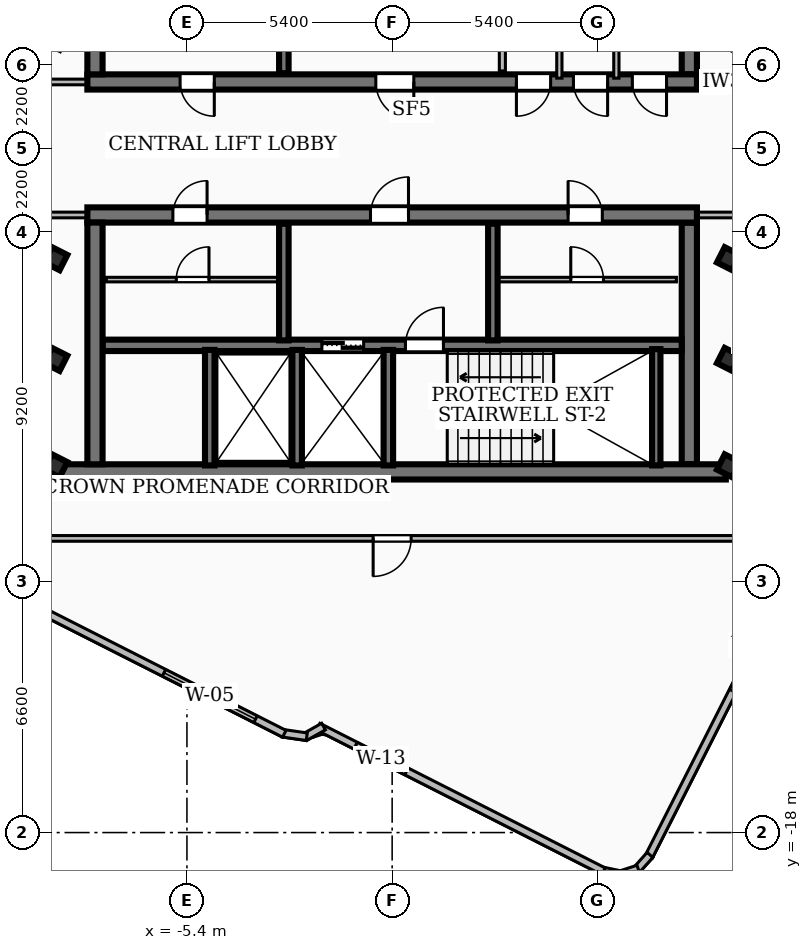
"""IFC4 building model, lengths in metres.
Left out: names, types, materials, properties, quantities, classifications, styles, units other than length and angle.
Written with IfcOpenShell. Run it as: python <this file> out.ifc"""

import sys

from ifc_helpers import new_model, si_unit, direction, frame, frame_2d, origin, origin_2d, place, context, subcontext, project, spatial, rectangle, hollow_rectangle, extrude, element, fill, save


model = new_model("IFC4")
c1 = context("Model", 3, precision=1e-05, world=origin(), true_north=direction((0.0, 1.0)))
c2 = subcontext(c1, "Body", "Model", "MODEL_VIEW")
j1 = project(units=[si_unit("LENGTHUNIT", "METRE"), si_unit("PLANEANGLEUNIT", "RADIAN")], contexts=[c1])
p1 = place(None, origin())
s1 = spatial("IfcSite", under=j1, at=p1, CompositionType="ELEMENT")
p2 = place(p1, origin())
s2 = spatial("IfcBuilding", under=s1, at=p2, CompositionType="ELEMENT")
p3 = place(p2, frame((0.0, 0.0, 289.26)))
s3 = spatial("IfcBuildingStorey", under=s2, at=p3, CompositionType="ELEMENT", Elevation=289.26)
p4 = place(p3, frame((8.02, 1.75, 0.0), z_axis=(0.0, 0.0, 1.0), x_axis=(-1.0, 0.0, 0.0)))
e1 = element("IfcWall", 1, at=p4, inside=s3, PredefinedType="SHEAR", context=c2, shape_type="SweptSolid", body=[
    extrude(rectangle(XDim=16.04, YDim=0.4, at=frame_2d((8.02, 0.0))), origin(), (0.0, 0.0, 1.0), 3.84),
])
p5 = place(p4, frame((7.45, 0.0, 0.0)))
e2 = element("IfcOpeningElement", 2, at=p5, cuts=e1, PredefinedType="OPENING", context=c2, shape_type="SweptSolid", body=[
    extrude(rectangle(XDim=1.0, YDim=2.1, at=frame_2d((0.5, 1.05))), frame((0.0, 0.21, 0.0), z_axis=(0.0, -1.0, 0.0), x_axis=(1.0, 0.0, 0.0)), (0.0, 0.0, 1.0), 0.42),
])
p6 = place(p4, frame((12.7, 0.0, 0.0)))
e3 = element("IfcOpeningElement", 3, at=p6, cuts=e1, PredefinedType="OPENING", context=c2, shape_type="SweptSolid", body=[
    extrude(rectangle(XDim=0.9, YDim=2.06, at=frame_2d((0.45, 1.03))), frame((0.0, 0.21, 0.0), z_axis=(0.0, -1.0, 0.0), x_axis=(1.0, 0.0, 0.0)), (0.0, 0.0, 1.0), 0.42),
])
p7 = place(p4, frame((3.85, 0.0, 0.0)))
e4 = element("IfcOpeningElement", 4, at=p7, cuts=e1, PredefinedType="OPENING", context=c2, shape_type="SweptSolid", body=[
    extrude(rectangle(XDim=0.9, YDim=2.06, at=frame_2d((0.45, 1.03))), frame((0.0, 0.21, 0.0), z_axis=(0.0, -1.0, 0.0), x_axis=(1.0, 0.0, 0.0)), (0.0, 0.0, 1.0), 0.42),
])
p8 = place(p4, frame((2.35, 0.0, 0.0)))
e5 = element("IfcOpeningElement", 5, at=p8, cuts=e1, PredefinedType="OPENING", context=c2, shape_type="SweptSolid", body=[
    extrude(rectangle(XDim=0.9, YDim=2.06, at=frame_2d((0.45, 1.03))), frame((0.0, 0.21, 0.0), z_axis=(0.0, -1.0, 0.0), x_axis=(1.0, 0.0, 0.0)), (0.0, 0.0, 1.0), 0.42),
])
p9 = place(p4, frame((0.8, 0.0, 0.0)))
e6 = element("IfcOpeningElement", 6, at=p9, cuts=e1, PredefinedType="OPENING", context=c2, shape_type="SweptSolid", body=[
    extrude(rectangle(XDim=0.9, YDim=2.06, at=frame_2d((0.45, 1.03))), frame((0.0, 0.21, 0.0), z_axis=(0.0, -1.0, 0.0), x_axis=(1.0, 0.0, 0.0)), (0.0, 0.0, 1.0), 0.42),
])
for number, where, z_axis, x_axis in (
    (7, (-7.82, 1.95, 0.0), (0.0, 0.0, 1.0), (0.0, 1.0, 0.0)),
    (8, (7.82, 8.31, 0.0), (0.0, 0.0, 1.0), (0.0, -1.0, 0.0)),
):
    element("IfcWall", number, at=place(p3, frame(where, z_axis=z_axis, x_axis=x_axis)), inside=s3, PredefinedType="SHEAR", context=c2, shape_type="SweptSolid", body=[
        extrude(rectangle(XDim=6.36, YDim=0.4, at=frame_2d((3.18, 0.0))), origin(), (0.0, 0.0, 1.0), 3.84),
    ])
p10 = place(p3, frame((8.78, -8.51, 0.0), z_axis=(0.0, 0.0, 1.0), x_axis=(-1.0, 0.0, 0.0)))
e9 = element("IfcWall", 9, at=p10, inside=s3, PredefinedType="SHEAR", context=c2, shape_type="SweptSolid", body=[
    extrude(rectangle(XDim=17.56, YDim=0.4, at=frame_2d((8.78, 0.0))), origin(), (0.0, 0.0, 1.0), 3.84),
])
p11 = place(p3, frame((-8.02, -1.75, 0.0), z_axis=(0.0, 0.0, 1.0), x_axis=(1.0, 0.0, 0.0)))
e10 = element("IfcWall", 10, at=p11, inside=s3, PredefinedType="SHEAR", context=c2, shape_type="SweptSolid", body=[
    extrude(rectangle(XDim=16.04, YDim=0.4, at=frame_2d((8.02, 0.0))), origin(), (0.0, 0.0, 1.0), 3.84),
])
p12 = place(p11, frame((7.45, 0.0, 0.0)))
e11 = element("IfcOpeningElement", 11, at=p12, cuts=e10, PredefinedType="OPENING", context=c2, shape_type="SweptSolid", body=[
    extrude(rectangle(XDim=1.0, YDim=2.1, at=frame_2d((0.5, 1.05))), frame((0.0, 0.21, 0.0), z_axis=(0.0, -1.0, 0.0), x_axis=(1.0, 0.0, 0.0)), (0.0, 0.0, 1.0), 0.42),
])
p13 = place(p11, frame((12.65, 0.0, 0.0)))
e12 = element("IfcOpeningElement", 12, at=p13, cuts=e10, PredefinedType="OPENING", context=c2, shape_type="SweptSolid", body=[
    extrude(rectangle(XDim=0.9, YDim=2.06, at=frame_2d((0.45, 1.03))), frame((0.0, 0.21, 0.0), z_axis=(0.0, -1.0, 0.0), x_axis=(1.0, 0.0, 0.0)), (0.0, 0.0, 1.0), 0.42),
])
p14 = place(p11, frame((2.25, 0.0, 0.0)))
e13 = element("IfcOpeningElement", 13, at=p14, cuts=e10, PredefinedType="OPENING", context=c2, shape_type="SweptSolid", body=[
    extrude(rectangle(XDim=0.9, YDim=2.06, at=frame_2d((0.45, 1.03))), frame((0.0, 0.21, 0.0), z_axis=(0.0, -1.0, 0.0), x_axis=(1.0, 0.0, 0.0)), (0.0, 0.0, 1.0), 0.42),
])
for number, where, z_axis, x_axis in (
    (14, (-7.82, -8.31, 0.0), (0.0, 0.0, 1.0), (0.0, 1.0, 0.0)),
    (15, (7.82, -1.95, 0.0), (0.0, 0.0, 1.0), (0.0, -1.0, 0.0)),
):
    element("IfcWall", number, at=place(p3, frame(where, z_axis=z_axis, x_axis=x_axis)), inside=s3, PredefinedType="SHEAR", context=c2, shape_type="SweptSolid", body=[
        extrude(rectangle(XDim=6.36, YDim=0.4, at=frame_2d((3.18, 0.0))), origin(), (0.0, 0.0, 1.0), 3.84),
    ])
p15 = place(p3, frame((-7.62, -5.18, 0.0), z_axis=(0.0, 0.0, 1.0), x_axis=(1.0, 0.0, 0.0)))
e16 = element("IfcWall", 16, at=p15, inside=s3, PredefinedType="SOLIDWALL", context=c2, shape_type="SweptSolid", body=[
    extrude(rectangle(XDim=15.24, YDim=0.3, at=frame_2d((7.62, 0.0))), origin(), (0.0, 0.0, 1.0), 3.84),
])
p16 = place(p15, frame((5.77, 0.0, 0.0)))
e17 = element("IfcOpeningElement", 17, at=p16, cuts=e16, PredefinedType="OPENING", context=c2, shape_type="SweptSolid", body=[
    extrude(rectangle(XDim=1.1, YDim=2.15, at=frame_2d((0.55, 1.075))), frame((0.0, 0.16, 0.0), z_axis=(0.0, -1.0, 0.0), x_axis=(1.0, 0.0, 0.0)), (0.0, 0.0, 1.0), 0.32),
])
p17 = place(p15, frame((7.97, 0.0, 0.0)))
e18 = element("IfcOpeningElement", 18, at=p17, cuts=e16, PredefinedType="OPENING", context=c2, shape_type="SweptSolid", body=[
    extrude(rectangle(XDim=1.0, YDim=2.1, at=frame_2d((0.5, 1.05))), frame((0.0, 0.16, 0.0), z_axis=(0.0, -1.0, 0.0), x_axis=(1.0, 0.0, 0.0)), (0.0, 0.0, 1.0), 0.32),
])
p18 = place(p3, frame((6.95, -8.34, 0.0), z_axis=(0.0, 0.0, 1.0), x_axis=(0.0, 1.0, 0.0)))
e19 = element("IfcWall", 19, at=p18, inside=s3, PredefinedType="SOLIDWALL", context=c2, shape_type="SweptSolid", body=[
    extrude(rectangle(XDim=3.06, YDim=0.22, at=frame_2d((1.53, 0.0))), origin(), (0.0, 0.0, 1.0), 3.84),
])
p19 = place(p3, frame((-2.85, 1.98, 0.0), z_axis=(0.0, 0.0, 1.0), x_axis=(0.0, 1.0, 0.0)))
e20 = element("IfcWall", 20, at=p19, inside=s3, PredefinedType="SOLIDWALL", context=c2, shape_type="SweptSolid", body=[
    extrude(rectangle(XDim=3.07, YDim=0.25, at=frame_2d((1.535, 0.0))), origin(), (0.0, 0.0, 1.0), 3.84),
])
for number, where, z_axis, x_axis in (
    (21, (-0.1, -8.34, 0.0), (0.0, 0.0, 1.0), (0.0, 1.0, 0.0)),
    (22, (-2.5, -8.34, 0.0), (0.0, 0.0, 1.0), (0.0, 1.0, 0.0)),
    (23, (-4.8, -8.34, 0.0), (0.0, 0.0, 1.0), (0.0, 1.0, 0.0)),
):
    element("IfcWall", number, at=place(p3, frame(where, z_axis=z_axis, x_axis=x_axis)), inside=s3, PredefinedType="SOLIDWALL", context=c2, shape_type="SweptSolid", body=[
        extrude(rectangle(XDim=3.04, YDim=0.25, at=frame_2d((1.52, 0.0))), origin(), (0.0, 0.0, 1.0), 3.84),
    ])
for number, where, z_axis, x_axis in (
    (24, (-2.85, -5.05, 0.0), (0.0, 0.0, 1.0), (0.0, 1.0, 0.0)),
    (25, (2.65, -5.05, 0.0), (0.0, 0.0, 1.0), (0.0, 1.0, 0.0)),
):
    element("IfcWall", number, at=place(p3, frame(where, z_axis=z_axis, x_axis=x_axis)), inside=s3, PredefinedType="SOLIDWALL", context=c2, shape_type="SweptSolid", body=[
        extrude(rectangle(XDim=3.07, YDim=0.25, at=frame_2d((1.535, 0.0))), origin(), (0.0, 0.0, 1.0), 3.84),
    ])
for number, where, z_axis, x_axis in (
    (26, (-8.85, -5.55, 0.0), (0.0, 0.0, 1.0), (0.452, 0.892, 0.0)),
    (27, (-8.85, -2.9, 0.0), (0.0, 0.0, 1.0), (0.452, 0.892, 0.0)),
    (28, (8.85, -5.55, 0.0), (0.0, 0.0, 1.0), (0.452, 0.892, 0.0)),
    (29, (8.85, -2.9, 0.0), (0.0, 0.0, 1.0), (0.452, 0.892, 0.0)),
    (30, (8.85, -8.35, 0.0), (0.0, 0.0, 1.0), (0.452, 0.892, 0.0)),
    (31, (-8.85, -8.35, 0.0), (0.0, 0.0, 1.0), (0.452, 0.892, 0.0)),
):
    element("IfcColumn", number, at=place(p3, frame(where, z_axis=z_axis, x_axis=x_axis)), inside=s3, PredefinedType="COLUMN", context=c2, shape_type="SweptSolid", body=[
        extrude(hollow_rectangle(XDim=0.45, YDim=0.45, WallThickness=0.022, at=origin_2d()), origin(), (0.0, 0.0, 1.0), 4.14),
    ])
p20 = place(p3, frame((10.569, -11.109, 0.0), z_axis=(0.0, 0.0, 1.0), x_axis=(-0.452141134176, -0.891946408024, 0.0)))
e32 = element("IfcWall", 32, at=p20, inside=s3, PredefinedType="SOLIDWALL", context=c2, shape_type="SweptSolid", body=[
    extrude(rectangle(XDim=8.431, YDim=0.2, at=frame_2d((4.215, 0.0))), origin(), (0.0, 0.0, 1.0), 3.84),
])
p21 = place(p20, frame((0.85, 0.0, 0.85)))
e33 = element("IfcOpeningElement", 33, at=p21, cuts=e32, PredefinedType="OPENING", context=c2, shape_type="SweptSolid", body=[
    extrude(rectangle(XDim=2.7, YDim=1.65, at=frame_2d((1.35, 0.825))), frame((0.0, 0.11, 0.0), z_axis=(0.0, -1.0, 0.0), x_axis=(1.0, 0.0, 0.0)), (0.0, 0.0, 1.0), 0.22),
])
p22 = place(p3, frame((6.785, -18.588, 0.0), z_axis=(0.0, 0.0, 1.0), x_axis=(-0.665997400104, -0.745954062295, 0.0)))
e34 = element("IfcWall", 34, at=p22, inside=s3, PredefinedType="SOLIDWALL", context=c2, shape_type="SweptSolid", body=[
    extrude(rectangle(XDim=0.528, YDim=0.2, at=frame_2d((0.264, 0.0))), origin(), (0.0, 0.0, 1.0), 3.84),
])
p23 = place(p3, frame((6.474, -18.955, 0.0), z_axis=(0.0, 0.0, 1.0), x_axis=(-0.950471064968, -0.310813054196, 0.0)))
e35 = element("IfcWall", 35, at=p23, inside=s3, PredefinedType="SOLIDWALL", context=c2, shape_type="SweptSolid", body=[
    extrude(rectangle(XDim=0.514, YDim=0.2, at=frame_2d((0.257, 0.0))), origin(), (0.0, 0.0, 1.0), 3.84),
])
p24 = place(p3, frame((6.033, -19.112, 0.0), z_axis=(0.0, 0.0, 1.0), x_axis=(-0.978721450967, 0.205193375664, 0.0)))
e36 = element("IfcWall", 36, at=p24, inside=s3, PredefinedType="SOLIDWALL", context=c2, shape_type="SweptSolid", body=[
    extrude(rectangle(XDim=0.527, YDim=0.2, at=frame_2d((0.264, 0.0))), origin(), (0.0, 0.0, 1.0), 3.84),
])
p25 = place(p3, frame((5.563, -19.02, 0.0), z_axis=(0.0, 0.0, 1.0), x_axis=(-0.891972005999, 0.452090633076, 0.0)))
e37 = element("IfcWall", 37, at=p25, inside=s3, PredefinedType="SOLIDWALL", context=c2, shape_type="SweptSolid", body=[
    extrude(rectangle(XDim=8.418, YDim=0.2, at=frame_2d((4.209, 0.0))), origin(), (0.0, 0.0, 1.0), 3.84),
])
p26 = place(p25, frame((5.816, 0.0, 0.85)))
e38 = element("IfcOpeningElement", 38, at=p26, cuts=e37, PredefinedType="OPENING", context=c2, shape_type="SweptSolid", body=[
    extrude(rectangle(XDim=1.5, YDim=1.8, at=frame_2d((0.75, 0.9))), frame((0.0, 0.11, 0.0), z_axis=(0.0, -1.0, 0.0), x_axis=(1.0, 0.0, 0.0)), (0.0, 0.0, 1.0), 0.22),
])
p27 = place(p3, frame((-1.805, -15.211, 0.0), z_axis=(0.0, 0.0, 1.0), x_axis=(-0.871517430789, -0.490364525461, 0.0)))
e39 = element("IfcWall", 39, at=p27, inside=s3, PredefinedType="SOLIDWALL", context=c2, shape_type="SweptSolid", body=[
    extrude(rectangle(XDim=0.561, YDim=0.2, at=frame_2d((0.281, 0.0))), origin(), (0.0, 0.0, 1.0), 3.84),
])
p28 = place(p3, frame((-2.247, -15.478, 0.0), z_axis=(0.0, 0.0, 1.0), x_axis=(-0.989720602345, 0.143014437364, 0.0)))
e40 = element("IfcWall", 40, at=p28, inside=s3, PredefinedType="SOLIDWALL", context=c2, shape_type="SweptSolid", body=[
    extrude(rectangle(XDim=0.644, YDim=0.2, at=frame_2d((0.322, 0.0))), origin(), (0.0, 0.0, 1.0), 3.84),
])
p29 = place(p3, frame((-2.837, -15.401, 0.0), z_axis=(0.0, 0.0, 1.0), x_axis=(-0.891990770647, 0.452053608636, 0.0)))
e41 = element("IfcWall", 41, at=p29, inside=s3, PredefinedType="SOLIDWALL", context=c2, shape_type="SweptSolid", body=[
    extrude(rectangle(XDim=8.866, YDim=0.2, at=frame_2d((4.433, 0.0))), origin(), (0.0, 0.0, 1.0), 3.84),
])
p30 = place(p29, frame((0.85, 0.0, 0.85)))
e42 = element("IfcOpeningElement", 42, at=p30, cuts=e41, PredefinedType="OPENING", context=c2, shape_type="SweptSolid", body=[
    extrude(rectangle(XDim=2.7, YDim=1.85, at=frame_2d((1.35, 0.925))), frame((0.0, 0.11, 0.0), z_axis=(0.0, -1.0, 0.0), x_axis=(1.0, 0.0, 0.0)), (0.0, 0.0, 1.0), 0.22),
])
p31 = place(p3, frame((2.9, 2.04, 0.0), z_axis=(0.0, 0.0, 1.0), x_axis=(0.0, 1.0, 0.0)))
e43 = element("IfcWall", 43, at=p31, inside=s3, PredefinedType="PARTITIONING", context=c2, shape_type="SweptSolid", body=[
    extrude(rectangle(XDim=2.94, YDim=0.16, at=frame_2d((1.47, 0.0))), origin(), (0.0, 0.0, 1.0), 3.07),
])
p32 = place(p31, frame((1.82, 0.0, 0.0)))
e44 = element("IfcOpeningElement", 44, at=p32, cuts=e43, PredefinedType="OPENING", context=c2, shape_type="SweptSolid", body=[
    extrude(rectangle(XDim=0.9, YDim=2.06, at=frame_2d((0.45, 1.03))), frame((0.0, 0.09, 0.0), z_axis=(0.0, -1.0, 0.0), x_axis=(1.0, 0.0, 0.0)), (0.0, 0.0, 1.0), 0.18),
])
p33 = place(p3, frame((2.8, -3.45, 0.0), z_axis=(0.0, 0.0, 1.0), x_axis=(1.0, 0.0, 0.0)))
e45 = element("IfcWall", 45, at=p33, inside=s3, PredefinedType="PARTITIONING", context=c2, shape_type="SweptSolid", body=[
    extrude(rectangle(XDim=4.68, YDim=0.12, at=frame_2d((2.34, 0.0))), origin(), (0.0, 0.0, 1.0), 3.84),
])
p34 = place(p33, frame((1.9, 0.0, 0.0)))
e46 = element("IfcOpeningElement", 46, at=p34, cuts=e45, PredefinedType="OPENING", context=c2, shape_type="SweptSolid", body=[
    extrude(rectangle(XDim=0.86, YDim=2.04, at=frame_2d((0.43, 1.02))), frame((0.0, 0.07, 0.0), z_axis=(0.0, -1.0, 0.0), x_axis=(1.0, 0.0, 0.0)), (0.0, 0.0, 1.0), 0.14),
])
p35 = place(p3, frame((-7.52, -3.45, 0.0), z_axis=(0.0, 0.0, 1.0), x_axis=(1.0, 0.0, 0.0)))
e47 = element("IfcWall", 47, at=p35, inside=s3, PredefinedType="PARTITIONING", context=c2, shape_type="SweptSolid", body=[
    extrude(rectangle(XDim=4.54, YDim=0.12, at=frame_2d((2.27, 0.0))), origin(), (0.0, 0.0, 1.0), 3.21),
])
p36 = place(p35, frame((1.84, 0.0, 0.0)))
e48 = element("IfcOpeningElement", 48, at=p36, cuts=e47, PredefinedType="OPENING", context=c2, shape_type="SweptSolid", body=[
    extrude(rectangle(XDim=0.86, YDim=2.04, at=frame_2d((0.43, 1.02))), frame((0.0, 0.07, 0.0), z_axis=(0.0, -1.0, 0.0), x_axis=(1.0, 0.0, 0.0)), (0.0, 0.0, 1.0), 0.14),
])
for number, where, z_axis, x_axis in (
    (49, (4.4, 1.85, 0.0), (0.0, 0.0, 1.0), (0.0, 1.0, 0.0)),
    (50, (5.9, 1.85, 0.0), (0.0, 0.0, 1.0), (0.0, 1.0, 0.0)),
):
    element("IfcWall", number, at=place(p3, frame(where, z_axis=z_axis, x_axis=x_axis)), inside=s3, PredefinedType="PARTITIONING", context=c2, shape_type="SweptSolid", body=[
        extrude(rectangle(XDim=1.89, YDim=0.138, at=frame_2d((0.945, 0.0))), origin(), (0.0, 0.0, 1.0), 3.07),
    ])
for number, where, z_axis, x_axis in (
    (51, (-7.85, 1.75, 0.0), (0.0, 0.0, 1.0), (-1.0, 0.0, 0.0)),
    (52, (-7.85, -1.75, 0.0), (0.0, 0.0, 1.0), (-1.0, 0.0, 0.0)),
    (53, (7.85, 1.75, 0.0), (0.0, 0.0, 1.0), (1.0, 0.0, 0.0)),
    (54, (7.85, -1.75, 0.0), (0.0, 0.0, 1.0), (1.0, 0.0, 0.0)),
):
    element("IfcWall", number, at=place(p3, frame(where, z_axis=z_axis, x_axis=x_axis)), inside=s3, PredefinedType="PARTITIONING", context=c2, shape_type="SweptSolid", body=[
        extrude(rectangle(XDim=1.67, YDim=0.15, at=frame_2d((0.835, 0.0))), origin(), (0.0, 0.0, 1.0), 3.07),
    ])
p37 = place(p3, frame((13.584, -10.26, 0.0), z_axis=(0.0, 0.0, 1.0), x_axis=(-1.0, 0.0, 0.0)))
e55 = element("IfcWall", 55, at=p37, inside=s3, PredefinedType="PARTITIONING", context=c2, shape_type="SweptSolid", body=[
    extrude(rectangle(XDim=25.159, YDim=0.15, at=frame_2d((12.58, 0.0))), origin(), (0.0, 0.0, 1.0), 3.84),
])
p38 = place(p37, frame((13.084, 0.0, 0.0)))
e56 = element("IfcOpeningElement", 56, at=p38, cuts=e55, PredefinedType="OPENING", context=c2, shape_type="SweptSolid", body=[
    extrude(rectangle(XDim=1.0, YDim=2.1, at=frame_2d((0.5, 1.05))), frame((0.0, 0.085, 0.0), z_axis=(0.0, -1.0, 0.0), x_axis=(1.0, 0.0, 0.0)), (0.0, 0.0, 1.0), 0.17),
])
p39 = place(p21, origin())
e57 = element("IfcWindow", 57, at=p39, inside=s3, PartitioningType="SINGLE_PANEL", PredefinedType="WINDOW", context=c2, shape_type="SweptSolid", body=[
    extrude(rectangle(XDim=2.7, YDim=1.65, at=frame_2d((1.35, 0.825))), frame((0.0, 0.03, 0.0), z_axis=(0.0, -1.0, 0.0), x_axis=(1.0, 0.0, 0.0)), (0.0, 0.0, 1.0), 0.06),
])
fill(e33, e57)
p40 = place(p26, origin())
e58 = element("IfcWindow", 58, at=p40, inside=s3, PartitioningType="SINGLE_PANEL", PredefinedType="WINDOW", context=c2, shape_type="SweptSolid", body=[
    extrude(rectangle(XDim=1.5, YDim=1.8, at=frame_2d((0.75, 0.9))), frame((0.0, 0.03, 0.0), z_axis=(0.0, -1.0, 0.0), x_axis=(1.0, 0.0, 0.0)), (0.0, 0.0, 1.0), 0.06),
])
fill(e38, e58)
p41 = place(p30, origin())
e59 = element("IfcWindow", 59, at=p41, inside=s3, PartitioningType="SINGLE_PANEL", PredefinedType="WINDOW", context=c2, shape_type="SweptSolid", body=[
    extrude(rectangle(XDim=2.7, YDim=1.85, at=frame_2d((1.35, 0.925))), frame((0.0, 0.03, 0.0), z_axis=(0.0, -1.0, 0.0), x_axis=(1.0, 0.0, 0.0)), (0.0, 0.0, 1.0), 0.06),
])
fill(e42, e59)
p42 = place(p5, origin())
e60 = element("IfcDoor", 60, at=p42, inside=s3, OperationType="SINGLE_SWING_LEFT", PredefinedType="DOOR", context=c2, shape_type="SweptSolid", body=[
    extrude(rectangle(XDim=1.0, YDim=2.1, at=frame_2d((0.5, 1.05))), frame((0.0, 0.025, 0.0), z_axis=(0.0, -1.0, 0.0), x_axis=(1.0, 0.0, 0.0)), (0.0, 0.0, 1.0), 0.05),
])
fill(e2, e60)
p43 = place(p12, origin())
e61 = element("IfcDoor", 61, at=p43, inside=s3, OperationType="SINGLE_SWING_RIGHT", PredefinedType="DOOR", context=c2, shape_type="SweptSolid", body=[
    extrude(rectangle(XDim=1.0, YDim=2.1, at=frame_2d((0.5, 1.05))), frame((0.0, 0.025, 0.0), z_axis=(0.0, -1.0, 0.0), x_axis=(1.0, 0.0, 0.0)), (0.0, 0.0, 1.0), 0.05),
])
fill(e11, e61)
p44 = place(p16, origin())
e62 = element("IfcDoor", 62, at=p44, inside=s3, OperationType="DOUBLE_DOOR_SLIDING", PredefinedType="DOOR", context=c2, shape_type="SweptSolid", body=[
    extrude(rectangle(XDim=1.1, YDim=2.15, at=frame_2d((0.55, 1.075))), frame((0.0, 0.025, 0.0), z_axis=(0.0, -1.0, 0.0), x_axis=(1.0, 0.0, 0.0)), (0.0, 0.0, 1.0), 0.05),
])
fill(e17, e62)
p45 = place(p17, origin())
e63 = element("IfcDoor", 63, at=p45, inside=s3, OperationType="SINGLE_SWING_RIGHT", PredefinedType="DOOR", context=c2, shape_type="SweptSolid", body=[
    extrude(rectangle(XDim=1.0, YDim=2.1, at=frame_2d((0.5, 1.05))), frame((0.0, 0.025, 0.0), z_axis=(0.0, -1.0, 0.0), x_axis=(1.0, 0.0, 0.0)), (0.0, 0.0, 1.0), 0.05),
])
fill(e18, e63)
p46 = place(p6, origin())
e64 = element("IfcDoor", 64, at=p46, inside=s3, OperationType="SINGLE_SWING_LEFT", PredefinedType="DOOR", context=c2, shape_type="SweptSolid", body=[
    extrude(rectangle(XDim=0.9, YDim=2.06, at=frame_2d((0.45, 1.03))), frame((0.0, 0.025, 0.0), z_axis=(0.0, -1.0, 0.0), x_axis=(1.0, 0.0, 0.0)), (0.0, 0.0, 1.0), 0.05),
])
fill(e3, e64)
p47 = place(p13, origin())
e65 = element("IfcDoor", 65, at=p47, inside=s3, OperationType="SINGLE_SWING_LEFT", PredefinedType="DOOR", context=c2, shape_type="SweptSolid", body=[
    extrude(rectangle(XDim=0.9, YDim=2.06, at=frame_2d((0.45, 1.03))), frame((0.0, 0.025, 0.0), z_axis=(0.0, -1.0, 0.0), x_axis=(1.0, 0.0, 0.0)), (0.0, 0.0, 1.0), 0.05),
])
fill(e12, e65)
p48 = place(p14, origin())
e66 = element("IfcDoor", 66, at=p48, inside=s3, OperationType="SINGLE_SWING_RIGHT", PredefinedType="DOOR", context=c2, shape_type="SweptSolid", body=[
    extrude(rectangle(XDim=0.9, YDim=2.06, at=frame_2d((0.45, 1.03))), frame((0.0, 0.025, 0.0), z_axis=(0.0, -1.0, 0.0), x_axis=(1.0, 0.0, 0.0)), (0.0, 0.0, 1.0), 0.05),
])
fill(e13, e66)
p49 = place(p7, origin())
e67 = element("IfcDoor", 67, at=p49, inside=s3, OperationType="SINGLE_SWING_RIGHT", PredefinedType="DOOR", context=c2, shape_type="SweptSolid", body=[
    extrude(rectangle(XDim=0.9, YDim=2.06, at=frame_2d((0.45, 1.03))), frame((0.0, 0.025, 0.0), z_axis=(0.0, -1.0, 0.0), x_axis=(1.0, 0.0, 0.0)), (0.0, 0.0, 1.0), 0.05),
])
fill(e4, e67)
p50 = place(p8, origin())
e68 = element("IfcDoor", 68, at=p50, inside=s3, OperationType="SINGLE_SWING_LEFT", PredefinedType="DOOR", context=c2, shape_type="SweptSolid", body=[
    extrude(rectangle(XDim=0.9, YDim=2.06, at=frame_2d((0.45, 1.03))), frame((0.0, 0.025, 0.0), z_axis=(0.0, -1.0, 0.0), x_axis=(1.0, 0.0, 0.0)), (0.0, 0.0, 1.0), 0.05),
])
fill(e5, e68)
p51 = place(p9, origin())
e69 = element("IfcDoor", 69, at=p51, inside=s3, OperationType="SINGLE_SWING_LEFT", PredefinedType="DOOR", context=c2, shape_type="SweptSolid", body=[
    extrude(rectangle(XDim=0.9, YDim=2.06, at=frame_2d((0.45, 1.03))), frame((0.0, 0.025, 0.0), z_axis=(0.0, -1.0, 0.0), x_axis=(1.0, 0.0, 0.0)), (0.0, 0.0, 1.0), 0.05),
])
fill(e6, e69)
p52 = place(p34, origin())
e70 = element("IfcDoor", 70, at=p52, inside=s3, OperationType="SINGLE_SWING_LEFT", PredefinedType="DOOR", context=c2, shape_type="SweptSolid", body=[
    extrude(rectangle(XDim=0.86, YDim=2.04, at=frame_2d((0.43, 1.02))), frame((0.0, 0.025, 0.0), z_axis=(0.0, -1.0, 0.0), x_axis=(1.0, 0.0, 0.0)), (0.0, 0.0, 1.0), 0.05),
])
fill(e46, e70)
p53 = place(p36, origin())
e71 = element("IfcDoor", 71, at=p53, inside=s3, OperationType="SINGLE_SWING_RIGHT", PredefinedType="DOOR", context=c2, shape_type="SweptSolid", body=[
    extrude(rectangle(XDim=0.86, YDim=2.04, at=frame_2d((0.43, 1.02))), frame((0.0, 0.025, 0.0), z_axis=(0.0, -1.0, 0.0), x_axis=(1.0, 0.0, 0.0)), (0.0, 0.0, 1.0), 0.05),
])
fill(e48, e71)
p54 = place(p38, origin())
e72 = element("IfcDoor", 72, at=p54, inside=s3, OperationType="SINGLE_SWING_RIGHT", PredefinedType="DOOR", context=c2, shape_type="SweptSolid", body=[
    extrude(rectangle(XDim=1.0, YDim=2.1, at=frame_2d((0.5, 1.05))), frame((0.0, 0.025, 0.0), z_axis=(0.0, -1.0, 0.0), x_axis=(1.0, 0.0, 0.0)), (0.0, 0.0, 1.0), 0.05),
])
fill(e56, e72)
save(model, sys.argv[1])
